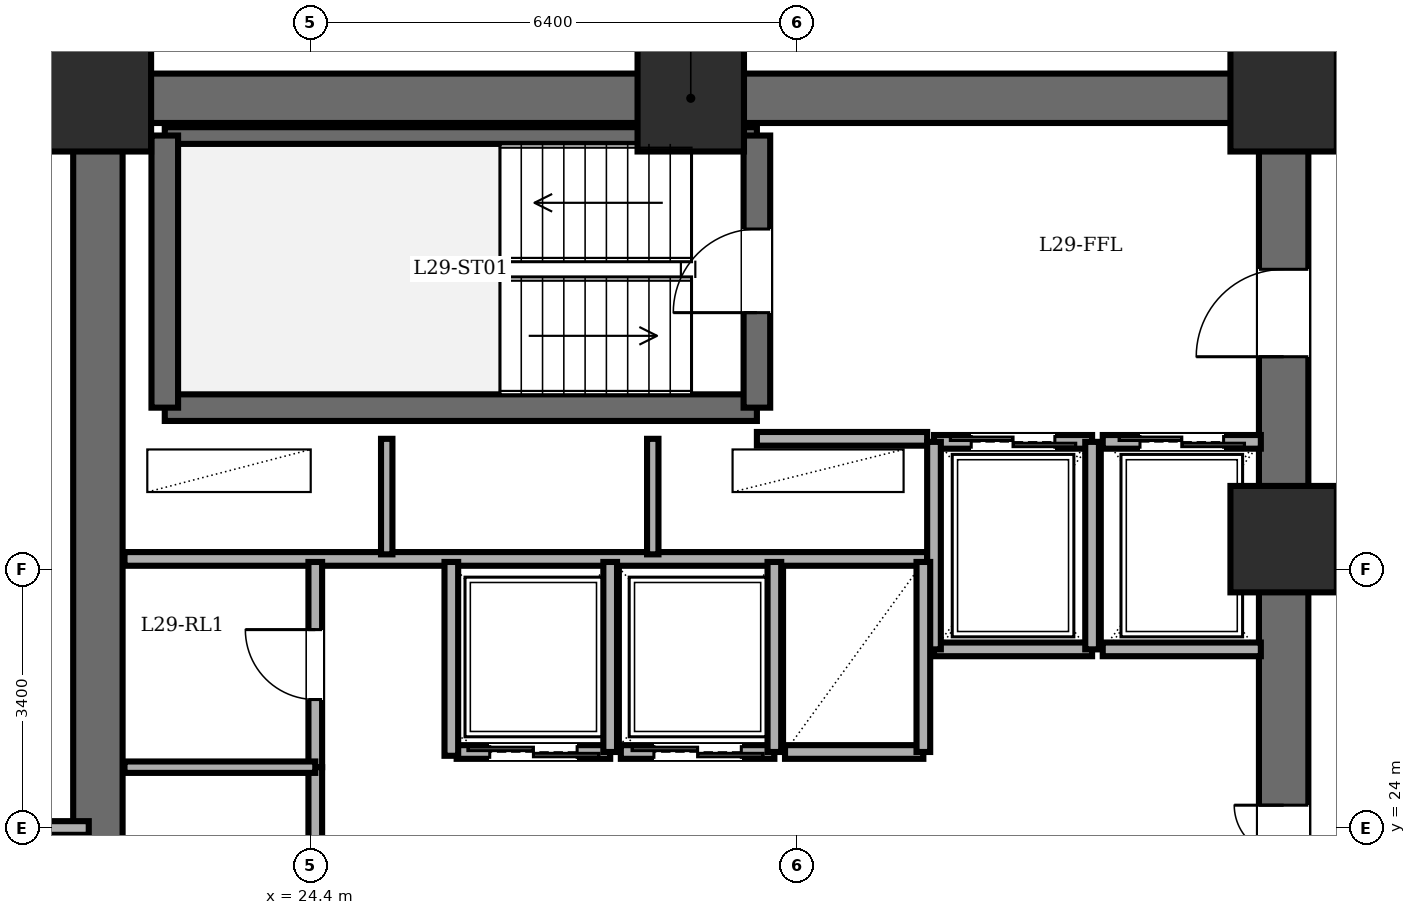
"""IFC4 building model, lengths in metres.
Left out: names, types, materials, properties, quantities, classifications, styles, units other than length and angle.
Written with IfcOpenShell. Run it as: python <this file> out.ifc"""

import sys

from ifc_helpers import new_model, si_unit, direction, frame, frame_2d, origin, origin_2d, place, context, subcontext, project, spatial, rectangle, extrude, element, fill, save


model = new_model("IFC4")
c1 = context("Model", 3, precision=1e-05, world=origin(), true_north=direction((0.0, 1.0)))
c2 = subcontext(c1, "Body", "Model", "MODEL_VIEW")
j1 = project(units=[si_unit("LENGTHUNIT", "METRE"), si_unit("PLANEANGLEUNIT", "RADIAN")], contexts=[c1])
p1 = place(None, origin())
s1 = spatial("IfcSite", under=j1, at=p1, CompositionType="ELEMENT")
p2 = place(p1, origin())
s2 = spatial("IfcBuilding", under=s1, at=p2, CompositionType="ELEMENT")
p3 = place(p2, frame((0.0, 0.0, 111.5)))
s3 = spatial("IfcBuildingStorey", under=s2, at=p3, CompositionType="ELEMENT", Elevation=111.5)
for number, where, z_axis, x_axis in (
    (1, (37.2, 27.8, 0.0), (0.0, 0.0, 1.0), (1.0, 0.0, 0.0)),
    (2, (37.2, 33.6, 0.0), (0.0, 0.0, 1.0), (1.0, 0.0, 0.0)),
    (3, (29.4, 33.6, 0.0), (0.0, 0.0, 1.0), (1.0, 0.0, 0.0)),
    (4, (21.6, 33.6, 0.0), (0.0, 0.0, 1.0), (1.0, 0.0, 0.0)),
):
    element("IfcColumn", number, at=place(p3, frame(where, z_axis=z_axis, x_axis=x_axis)), inside=s3, PredefinedType="COLUMN", context=c2, shape_type="SweptSolid", body=[
        extrude(rectangle(XDim=1.4, YDim=1.4, at=origin_2d()), origin(), (0.0, 0.0, 1.0), 3.6),
    ])
p4 = place(p3, frame((21.6, 14.4, 0.0), z_axis=(0.0, 0.0, 1.0), x_axis=(0.0, 1.0, 0.0)))
e5 = element("IfcWall", 5, at=p4, inside=s3, PredefinedType="SHEAR", context=c2, shape_type="SweptSolid", body=[
    extrude(rectangle(XDim=19.2, YDim=0.65, at=frame_2d((9.6, 0.0))), origin(), (0.0, 0.0, 1.0), 3.4),
])
p5 = place(p3, frame((21.6, 33.6, 0.0), z_axis=(0.0, 0.0, 1.0), x_axis=(1.0, 0.0, 0.0)))
e6 = element("IfcWall", 6, at=p5, inside=s3, PredefinedType="SHEAR", context=c2, shape_type="SweptSolid", body=[
    extrude(rectangle(XDim=15.6, YDim=0.65, at=frame_2d((7.8, 0.0))), origin(), (0.0, 0.0, 1.0), 3.4),
])
p6 = place(p3, frame((37.2, 14.4, 0.0), z_axis=(0.0, 0.0, 1.0), x_axis=(0.0, 1.0, 0.0)))
e7 = element("IfcWall", 7, at=p6, inside=s3, PredefinedType="SHEAR", context=c2, shape_type="SweptSolid", body=[
    extrude(rectangle(XDim=19.2, YDim=0.65, at=frame_2d((9.6, 0.0))), origin(), (0.0, 0.0, 1.0), 3.4),
])
p7 = place(p6, frame((15.8, 0.0, 0.0)))
e8 = element("IfcOpeningElement", 8, at=p7, cuts=e7, PredefinedType="OPENING", context=c2, shape_type="SweptSolid", body=[
    extrude(rectangle(XDim=1.15, YDim=2.15, at=frame_2d((0.575, 1.075))), frame((0.0, 0.335, 0.0), z_axis=(0.0, -1.0, 0.0), x_axis=(1.0, 0.0, 0.0)), (0.0, 0.0, 1.0), 0.67),
])
p8 = place(p6, frame((3.6, 0.0, 0.0)))
e9 = element("IfcOpeningElement", 9, at=p8, cuts=e7, PredefinedType="OPENING", context=c2, shape_type="SweptSolid", body=[
    extrude(rectangle(XDim=1.1, YDim=2.15, at=frame_2d((0.55, 1.075))), frame((0.0, 0.335, 0.0), z_axis=(0.0, -1.0, 0.0), x_axis=(1.0, 0.0, 0.0)), (0.0, 0.0, 1.0), 0.67),
])
p9 = place(p6, frame((8.6, 0.0, 0.0)))
e10 = element("IfcOpeningElement", 10, at=p9, cuts=e7, PredefinedType="OPENING", context=c2, shape_type="SweptSolid", body=[
    extrude(rectangle(XDim=1.3, YDim=2.2, at=frame_2d((0.65, 1.1))), frame((0.0, 0.335, 0.0), z_axis=(0.0, -1.0, 0.0), x_axis=(1.0, 0.0, 0.0)), (0.0, 0.0, 1.0), 0.67),
])
p10 = place(p3, frame((22.48, 29.53, 0.0), z_axis=(0.0, 0.0, 1.0), x_axis=(1.0, 0.0, 0.0)))
e11 = element("IfcWall", 11, at=p10, inside=s3, PredefinedType="SOLIDWALL", context=c2, shape_type="SweptSolid", body=[
    extrude(rectangle(XDim=7.79, YDim=0.35, at=frame_2d((3.895, 0.0))), origin(), (0.0, 0.0, 1.0), 3.4),
])
p11 = place(p3, frame((22.48, 33.11, 0.0), z_axis=(0.0, 0.0, 1.0), x_axis=(1.0, 0.0, 0.0)))
e12 = element("IfcWall", 12, at=p11, inside=s3, PredefinedType="PARTITIONING", context=c2, shape_type="SweptSolid", body=[
    extrude(rectangle(XDim=7.79, YDim=0.22, at=frame_2d((3.895, 0.0))), origin(), (0.0, 0.0, 1.0), 3.4),
])
p12 = place(p3, frame((22.48, 29.53, 0.0), z_axis=(0.0, 0.0, 1.0), x_axis=(0.0, 1.0, 0.0)))
e13 = element("IfcWall", 13, at=p12, inside=s3, PredefinedType="SOLIDWALL", context=c2, shape_type="SweptSolid", body=[
    extrude(rectangle(XDim=3.58, YDim=0.35, at=frame_2d((1.79, 0.0))), origin(), (0.0, 0.0, 1.0), 3.4),
])
p13 = place(p3, frame((30.27, 29.53, 0.0), z_axis=(0.0, 0.0, 1.0), x_axis=(0.0, 1.0, 0.0)))
e14 = element("IfcWall", 14, at=p13, inside=s3, PredefinedType="SOLIDWALL", context=c2, shape_type="SweptSolid", body=[
    extrude(rectangle(XDim=3.58, YDim=0.35, at=frame_2d((1.79, 0.0))), origin(), (0.0, 0.0, 1.0), 3.4),
])
p14 = place(p13, frame((1.25, 0.0, 0.0)))
e15 = element("IfcOpeningElement", 15, at=p14, cuts=e14, PredefinedType="OPENING", context=c2, shape_type="SweptSolid", body=[
    extrude(rectangle(XDim=1.1, YDim=2.15, at=frame_2d((0.55, 1.075))), frame((0.0, 0.185, 0.0), z_axis=(0.0, -1.0, 0.0), x_axis=(1.0, 0.0, 0.0)), (0.0, 0.0, 1.0), 0.37),
])
p15 = place(p3, frame((30.27, 29.12, 0.0), z_axis=(0.0, 0.0, 1.0), x_axis=(1.0, 0.0, 0.0)))
e16 = element("IfcWall", 16, at=p15, inside=s3, PredefinedType="PARTITIONING", context=c2, shape_type="SweptSolid", body=[
    extrude(rectangle(XDim=2.24, YDim=0.18, at=frame_2d((1.12, 0.0))), origin(), (0.0, 0.0, 1.0), 3.4),
])
p16 = place(p3, frame((21.95, 27.54, 0.0), z_axis=(0.0, 0.0, 1.0), x_axis=(1.0, 0.0, 0.0)))
e17 = element("IfcWall", 17, at=p16, inside=s3, PredefinedType="PARTITIONING", context=c2, shape_type="SweptSolid", body=[
    extrude(rectangle(XDim=10.56, YDim=0.18, at=frame_2d((5.28, 0.0))), origin(), (0.0, 0.0, 1.0), 3.4),
])
for number, where, z_axis, x_axis in (
    (18, (25.4, 27.6, 0.0), (0.0, 0.0, 1.0), (0.0, 1.0, 0.0)),
    (19, (28.9, 27.6, 0.0), (0.0, 0.0, 1.0), (0.0, 1.0, 0.0)),
):
    element("IfcWall", number, at=place(p3, frame(where, z_axis=z_axis, x_axis=x_axis)), inside=s3, PredefinedType="PARTITIONING", context=c2, shape_type="SweptSolid", body=[
        extrude(rectangle(XDim=1.52, YDim=0.15, at=frame_2d((0.76, 0.0))), origin(), (0.0, 0.0, 1.0), 3.4),
    ])
p17 = place(p3, frame((32.6, 29.08, 0.0), z_axis=(0.0, 0.0, 1.0), x_axis=(1.0, 0.0, 0.0)))
e20 = element("IfcWall", 20, at=p17, inside=s3, PredefinedType="PARTITIONING", context=c2, shape_type="SweptSolid", body=[
    extrude(rectangle(XDim=2.08, YDim=0.18, at=frame_2d((1.04, 0.0))), origin(), (0.0, 0.0, 1.0), 3.4),
])
p18 = place(p17, frame((0.49, 0.0, 0.0)))
e21 = element("IfcOpeningElement", 21, at=p18, cuts=e20, PredefinedType="OPENING", context=c2, shape_type="SweptSolid", body=[
    extrude(rectangle(XDim=1.1, YDim=2.2, at=frame_2d((0.55, 1.1))), frame((0.0, 0.1, 0.0), z_axis=(0.0, -1.0, 0.0), x_axis=(1.0, 0.0, 0.0)), (0.0, 0.0, 1.0), 0.2),
])
p19 = place(p3, frame((34.68, 26.35, 0.0), z_axis=(0.0, 0.0, 1.0), x_axis=(-1.0, 0.0, 0.0)))
e22 = element("IfcWall", 22, at=p19, inside=s3, PredefinedType="PARTITIONING", context=c2, shape_type="SweptSolid", body=[
    extrude(rectangle(XDim=2.08, YDim=0.18, at=frame_2d((1.04, 0.0))), origin(), (0.0, 0.0, 1.0), 3.4),
])
for number, where, z_axis, x_axis in (
    (23, (34.68, 26.35, 0.0), (0.0, 0.0, 1.0), (0.0, 1.0, 0.0)),
    (24, (32.6, 29.08, 0.0), (0.0, 0.0, 1.0), (0.0, -1.0, 0.0)),
):
    element("IfcWall", number, at=place(p3, frame(where, z_axis=z_axis, x_axis=x_axis)), inside=s3, PredefinedType="PARTITIONING", context=c2, shape_type="SweptSolid", body=[
        extrude(rectangle(XDim=2.73, YDim=0.18, at=frame_2d((1.365, 0.0))), origin(), (0.0, 0.0, 1.0), 3.4),
    ])
p20 = place(p3, frame((34.82, 29.08, 0.0), z_axis=(0.0, 0.0, 1.0), x_axis=(1.0, 0.0, 0.0)))
e25 = element("IfcWall", 25, at=p20, inside=s3, PredefinedType="PARTITIONING", context=c2, shape_type="SweptSolid", body=[
    extrude(rectangle(XDim=2.08, YDim=0.18, at=frame_2d((1.04, 0.0))), origin(), (0.0, 0.0, 1.0), 3.4),
])
p21 = place(p20, frame((0.49, 0.0, 0.0)))
e26 = element("IfcOpeningElement", 26, at=p21, cuts=e25, PredefinedType="OPENING", context=c2, shape_type="SweptSolid", body=[
    extrude(rectangle(XDim=1.1, YDim=2.2, at=frame_2d((0.55, 1.1))), frame((0.0, 0.1, 0.0), z_axis=(0.0, -1.0, 0.0), x_axis=(1.0, 0.0, 0.0)), (0.0, 0.0, 1.0), 0.2),
])
p22 = place(p3, frame((36.9, 26.35, 0.0), z_axis=(0.0, 0.0, 1.0), x_axis=(-1.0, 0.0, 0.0)))
e27 = element("IfcWall", 27, at=p22, inside=s3, PredefinedType="PARTITIONING", context=c2, shape_type="SweptSolid", body=[
    extrude(rectangle(XDim=2.08, YDim=0.18, at=frame_2d((1.04, 0.0))), origin(), (0.0, 0.0, 1.0), 3.4),
])
p23 = place(p3, frame((28.34, 25.0, 0.0), z_axis=(0.0, 0.0, 1.0), x_axis=(-1.0, 0.0, 0.0)))
e28 = element("IfcWall", 28, at=p23, inside=s3, PredefinedType="PARTITIONING", context=c2, shape_type="SweptSolid", body=[
    extrude(rectangle(XDim=2.02, YDim=0.18, at=frame_2d((1.01, 0.0))), origin(), (0.0, 0.0, 1.0), 3.4),
])
p24 = place(p23, frame((0.435, 0.0, 0.0)))
e29 = element("IfcOpeningElement", 29, at=p24, cuts=e28, PredefinedType="OPENING", context=c2, shape_type="SweptSolid", body=[
    extrude(rectangle(XDim=1.15, YDim=2.2, at=frame_2d((0.575, 1.1))), frame((0.0, 0.1, 0.0), z_axis=(0.0, -1.0, 0.0), x_axis=(1.0, 0.0, 0.0)), (0.0, 0.0, 1.0), 0.2),
])
p25 = place(p3, frame((28.34, 25.0, 0.0), z_axis=(0.0, 0.0, 1.0), x_axis=(0.0, 1.0, 0.0)))
e30 = element("IfcWall", 30, at=p25, inside=s3, PredefinedType="PARTITIONING", context=c2, shape_type="SweptSolid", body=[
    extrude(rectangle(XDim=2.5, YDim=0.18, at=frame_2d((1.25, 0.0))), origin(), (0.0, 0.0, 1.0), 3.4),
])
p26 = place(p3, frame((30.5, 25.0, 0.0), z_axis=(0.0, 0.0, 1.0), x_axis=(-1.0, 0.0, 0.0)))
e31 = element("IfcWall", 31, at=p26, inside=s3, PredefinedType="PARTITIONING", context=c2, shape_type="SweptSolid", body=[
    extrude(rectangle(XDim=2.02, YDim=0.18, at=frame_2d((1.01, 0.0))), origin(), (0.0, 0.0, 1.0), 3.4),
])
p27 = place(p26, frame((0.435, 0.0, 0.0)))
e32 = element("IfcOpeningElement", 32, at=p27, cuts=e31, PredefinedType="OPENING", context=c2, shape_type="SweptSolid", body=[
    extrude(rectangle(XDim=1.15, YDim=2.2, at=frame_2d((0.575, 1.1))), frame((0.0, 0.1, 0.0), z_axis=(0.0, -1.0, 0.0), x_axis=(1.0, 0.0, 0.0)), (0.0, 0.0, 1.0), 0.2),
])
p28 = place(p3, frame((30.5, 25.0, 0.0), z_axis=(0.0, 0.0, 1.0), x_axis=(0.0, 1.0, 0.0)))
e33 = element("IfcWall", 33, at=p28, inside=s3, PredefinedType="PARTITIONING", context=c2, shape_type="SweptSolid", body=[
    extrude(rectangle(XDim=2.5, YDim=0.18, at=frame_2d((1.25, 0.0))), origin(), (0.0, 0.0, 1.0), 3.4),
])
p29 = place(p3, frame((32.46, 25.0, 0.0), z_axis=(0.0, 0.0, 1.0), x_axis=(-1.0, 0.0, 0.0)))
e34 = element("IfcWall", 34, at=p29, inside=s3, PredefinedType="PARTITIONING", context=c2, shape_type="SweptSolid", body=[
    extrude(rectangle(XDim=1.82, YDim=0.18, at=frame_2d((0.91, 0.0))), origin(), (0.0, 0.0, 1.0), 3.4),
])
p30 = place(p3, frame((32.46, 25.0, 0.0), z_axis=(0.0, 0.0, 1.0), x_axis=(0.0, 1.0, 0.0)))
e35 = element("IfcWall", 35, at=p30, inside=s3, PredefinedType="PARTITIONING", context=c2, shape_type="SweptSolid", body=[
    extrude(rectangle(XDim=2.5, YDim=0.18, at=frame_2d((1.25, 0.0))), origin(), (0.0, 0.0, 1.0), 3.4),
])
p31 = place(p3, frame((24.46, 24.8, 0.0), z_axis=(0.0, 0.0, 1.0), x_axis=(0.0, 1.0, 0.0)))
e36 = element("IfcWall", 36, at=p31, inside=s3, PredefinedType="PARTITIONING", context=c2, shape_type="SweptSolid", body=[
    extrude(rectangle(XDim=2.7, YDim=0.18, at=frame_2d((1.35, 0.0))), origin(), (0.0, 0.0, 1.0), 3.4),
])
p32 = place(p31, frame((0.89, 0.0, 0.0)))
e37 = element("IfcOpeningElement", 37, at=p32, cuts=e36, PredefinedType="OPENING", context=c2, shape_type="SweptSolid", body=[
    extrude(rectangle(XDim=0.92, YDim=2.1, at=frame_2d((0.46, 1.05))), frame((0.0, 0.1, 0.0), z_axis=(0.0, -1.0, 0.0), x_axis=(1.0, 0.0, 0.0)), (0.0, 0.0, 1.0), 0.2),
])
p33 = place(p3, frame((24.46, 19.8, 0.0), z_axis=(0.0, 0.0, 1.0), x_axis=(0.0, 1.0, 0.0)))
e38 = element("IfcWall", 38, at=p33, inside=s3, PredefinedType="PARTITIONING", context=c2, shape_type="SweptSolid", body=[
    extrude(rectangle(XDim=5.0, YDim=0.18, at=frame_2d((2.5, 0.0))), origin(), (0.0, 0.0, 1.0), 3.4),
])
p34 = place(p33, frame((2.04, 0.0, 0.0)))
e39 = element("IfcOpeningElement", 39, at=p34, cuts=e38, PredefinedType="OPENING", context=c2, shape_type="SweptSolid", body=[
    extrude(rectangle(XDim=0.92, YDim=2.1, at=frame_2d((0.46, 1.05))), frame((0.0, 0.1, 0.0), z_axis=(0.0, -1.0, 0.0), x_axis=(1.0, 0.0, 0.0)), (0.0, 0.0, 1.0), 0.2),
])
p35 = place(p3, frame((21.95, 24.8, 0.0), z_axis=(0.0, 0.0, 1.0), x_axis=(1.0, 0.0, 0.0)))
e40 = element("IfcWall", 40, at=p35, inside=s3, PredefinedType="PARTITIONING", context=c2, shape_type="SweptSolid", body=[
    extrude(rectangle(XDim=2.51, YDim=0.15, at=frame_2d((1.255, 0.0))), origin(), (0.0, 0.0, 1.0), 3.4),
])
p36 = place(p3, frame((26.25, 24.95, 0.0), z_axis=(0.0, 0.0, 1.0), x_axis=(0.0, 1.0, 0.0)))
e41 = element("IfcWall", 41, at=p36, inside=s3, PredefinedType="PARTITIONING", context=c2, shape_type="SweptSolid", body=[
    extrude(rectangle(XDim=2.55, YDim=0.18, at=frame_2d((1.275, 0.0))), origin(), (0.0, 0.0, 1.0), 3.4),
])
p37 = place(p3, frame((8.8, 24.0, 0.0), z_axis=(0.0, 0.0, 1.0), x_axis=(1.0, 0.0, 0.0)))
e42 = element("IfcWall", 42, at=p37, inside=s3, PredefinedType="PARTITIONING", context=c2, shape_type="SweptSolid", body=[
    extrude(rectangle(XDim=12.68, YDim=0.18, at=frame_2d((6.34, 0.0))), origin(), (0.0, 0.0, 1.0), 3.4),
])
p38 = place(p3, frame((8.8, 33.82, 0.0), z_axis=(0.0, 0.0, 1.0), x_axis=(1.0, 0.0, 0.0)))
e43 = element("IfcWall", 43, at=p38, inside=s3, PredefinedType="PARTITIONING", context=c2, shape_type="SweptSolid", body=[
    extrude(rectangle(XDim=12.68, YDim=0.18, at=frame_2d((6.34, 0.0))), origin(), (0.0, 0.0, 1.0), 3.4),
])
p39 = place(p38, frame((6.18, 0.0, 0.0)))
e44 = element("IfcOpeningElement", 44, at=p39, cuts=e43, PredefinedType="OPENING", context=c2, shape_type="SweptSolid", body=[
    extrude(rectangle(XDim=1.0, YDim=2.15, at=frame_2d((0.5, 1.075))), frame((0.0, 0.1, 0.0), z_axis=(0.0, -1.0, 0.0), x_axis=(1.0, 0.0, 0.0)), (0.0, 0.0, 1.0), 0.2),
])
p40 = place(p14, origin())
e45 = element("IfcDoor", 45, at=p40, inside=s3, OperationType="SINGLE_SWING_LEFT", PredefinedType="DOOR", context=c2, shape_type="SweptSolid", body=[
    extrude(rectangle(XDim=1.1, YDim=2.15, at=frame_2d((0.55, 1.075))), frame((0.0, 0.025, 0.0), z_axis=(0.0, -1.0, 0.0), x_axis=(1.0, 0.0, 0.0)), (0.0, 0.0, 1.0), 0.05),
])
fill(e15, e45)
p41 = place(p7, origin())
e46 = element("IfcDoor", 46, at=p41, inside=s3, OperationType="SINGLE_SWING_LEFT", PredefinedType="DOOR", context=c2, shape_type="SweptSolid", body=[
    extrude(rectangle(XDim=1.15, YDim=2.15, at=frame_2d((0.575, 1.075))), frame((0.0, 0.025, 0.0), z_axis=(0.0, -1.0, 0.0), x_axis=(1.0, 0.0, 0.0)), (0.0, 0.0, 1.0), 0.05),
])
fill(e8, e46)
p42 = place(p18, origin())
e47 = element("IfcDoor", 47, at=p42, inside=s3, OperationType="DOUBLE_DOOR_SLIDING", PredefinedType="DOOR", context=c2, shape_type="SweptSolid", body=[
    extrude(rectangle(XDim=1.1, YDim=2.2, at=frame_2d((0.55, 1.1))), frame((0.0, 0.025, 0.0), z_axis=(0.0, -1.0, 0.0), x_axis=(1.0, 0.0, 0.0)), (0.0, 0.0, 1.0), 0.05),
])
fill(e21, e47)
p43 = place(p21, origin())
e48 = element("IfcDoor", 48, at=p43, inside=s3, OperationType="DOUBLE_DOOR_SLIDING", PredefinedType="DOOR", context=c2, shape_type="SweptSolid", body=[
    extrude(rectangle(XDim=1.1, YDim=2.2, at=frame_2d((0.55, 1.1))), frame((0.0, 0.025, 0.0), z_axis=(0.0, -1.0, 0.0), x_axis=(1.0, 0.0, 0.0)), (0.0, 0.0, 1.0), 0.05),
])
fill(e26, e48)
p44 = place(p24, origin())
e49 = element("IfcDoor", 49, at=p44, inside=s3, OperationType="DOUBLE_DOOR_SLIDING", PredefinedType="DOOR", context=c2, shape_type="SweptSolid", body=[
    extrude(rectangle(XDim=1.15, YDim=2.2, at=frame_2d((0.575, 1.1))), frame((0.0, 0.025, 0.0), z_axis=(0.0, -1.0, 0.0), x_axis=(1.0, 0.0, 0.0)), (0.0, 0.0, 1.0), 0.05),
])
fill(e29, e49)
p45 = place(p27, origin())
e50 = element("IfcDoor", 50, at=p45, inside=s3, OperationType="DOUBLE_DOOR_SLIDING", PredefinedType="DOOR", context=c2, shape_type="SweptSolid", body=[
    extrude(rectangle(XDim=1.15, YDim=2.2, at=frame_2d((0.575, 1.1))), frame((0.0, 0.025, 0.0), z_axis=(0.0, -1.0, 0.0), x_axis=(1.0, 0.0, 0.0)), (0.0, 0.0, 1.0), 0.05),
])
fill(e32, e50)
p46 = place(p32, origin())
e51 = element("IfcDoor", 51, at=p46, inside=s3, OperationType="SINGLE_SWING_RIGHT", PredefinedType="DOOR", context=c2, shape_type="SweptSolid", body=[
    extrude(rectangle(XDim=0.92, YDim=2.1, at=frame_2d((0.46, 1.05))), frame((0.0, 0.025, 0.0), z_axis=(0.0, -1.0, 0.0), x_axis=(1.0, 0.0, 0.0)), (0.0, 0.0, 1.0), 0.05),
])
fill(e37, e51)
p47 = place(p9, origin())
e52 = element("IfcDoor", 52, at=p47, inside=s3, OperationType="DOUBLE_DOOR_SINGLE_SWING", PredefinedType="DOOR", context=c2, shape_type="SweptSolid", body=[
    extrude(rectangle(XDim=1.3, YDim=2.2, at=frame_2d((0.65, 1.1))), frame((0.0, 0.025, 0.0), z_axis=(0.0, -1.0, 0.0), x_axis=(1.0, 0.0, 0.0)), (0.0, 0.0, 1.0), 0.05),
])
fill(e10, e52)
save(model, sys.argv[1])
